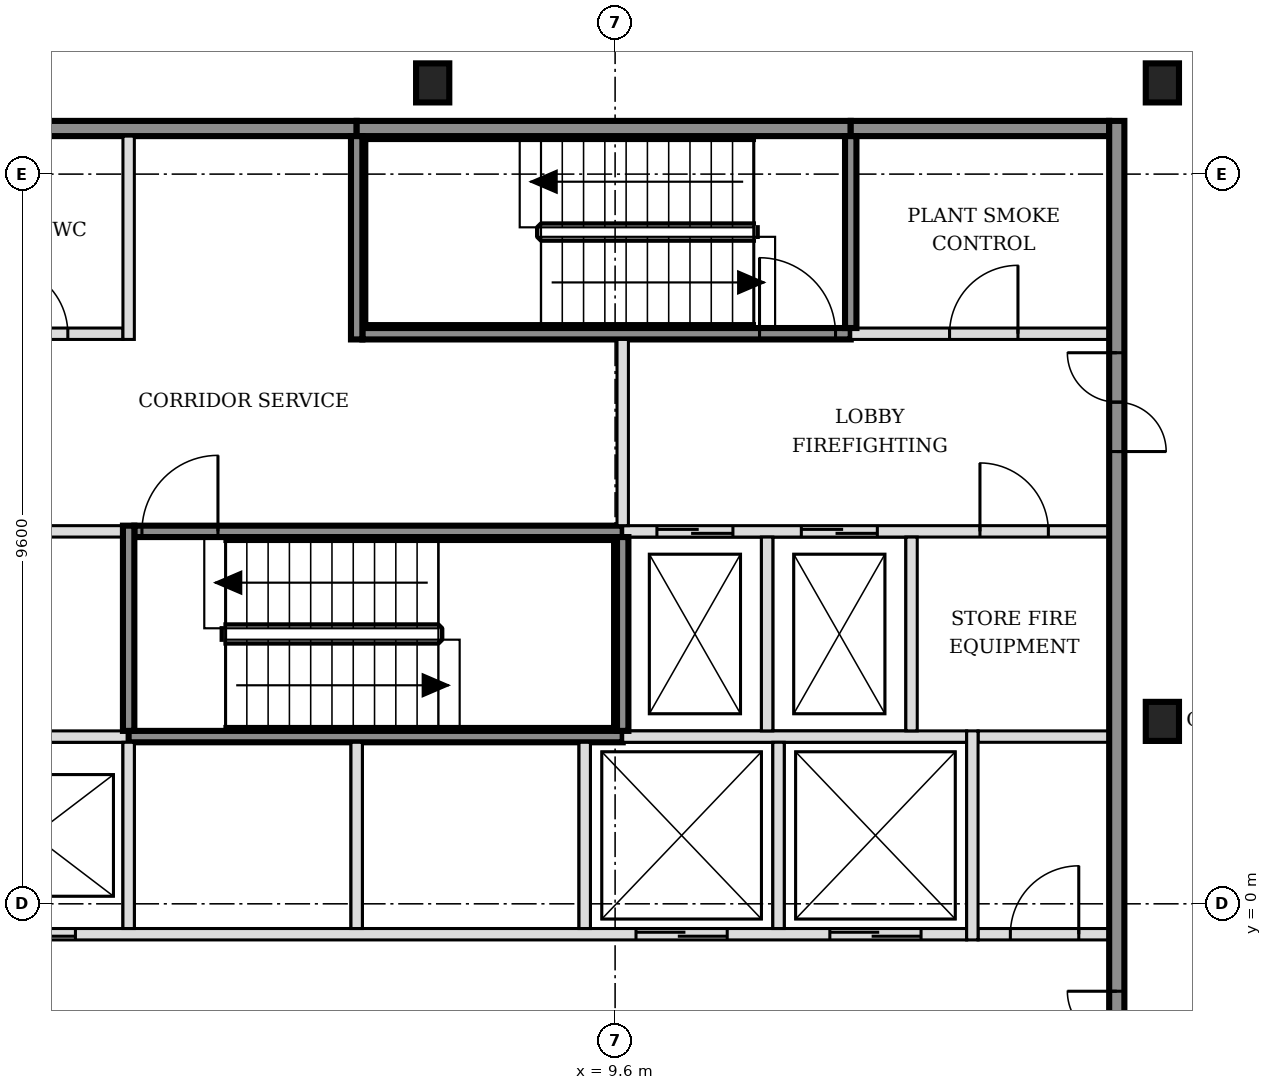
"""IFC4 building model, lengths in metres.
Left out: names, types, materials, properties, quantities, classifications, styles, units other than length and angle.
Written with IfcOpenShell. Run it as: python <this file> out.ifc"""

import sys

from ifc_helpers import new_model, si_unit, direction, frame, frame_2d, origin, origin_2d, place, context, subcontext, project, spatial, rectangle, i_section, extrude, element, fill, save


model = new_model("IFC4")
c1 = context("Model", 3, precision=1e-05, world=origin(), true_north=direction((0.0, 1.0)))
c2 = subcontext(c1, "Body", "Model", "MODEL_VIEW")
j1 = project(units=[si_unit("LENGTHUNIT", "METRE"), si_unit("PLANEANGLEUNIT", "RADIAN")], contexts=[c1])
p1 = place(None, origin())
s1 = spatial("IfcSite", under=j1, at=p1, CompositionType="ELEMENT")
p2 = place(p1, origin())
s2 = spatial("IfcBuilding", under=s1, at=p2, CompositionType="ELEMENT")
p3 = place(p2, frame((0.0, 0.0, 72.6)))
s3 = spatial("IfcBuildingStorey", under=s2, at=p3, CompositionType="ELEMENT", Elevation=72.6)
for number, where, z_axis, x_axis in (
    (1, (16.8, 2.4, -0.15), (0.0, 0.0, 1.0), (1.0, 0.0, 0.0)),
    (2, (7.2, 10.8, -0.15), (0.0, 0.0, 1.0), (1.0, 0.0, 0.0)),
    (3, (16.8, 10.8, -0.15), (0.0, 0.0, 1.0), (1.0, 0.0, 0.0)),
):
    element("IfcColumn", number, at=place(p3, frame(where, z_axis=z_axis, x_axis=x_axis)), inside=s3, PredefinedType="COLUMN", context=c2, shape_type="SweptSolid", body=[
        extrude(i_section(OverallWidth=0.437, OverallDepth=0.514, WebThickness=0.061, FlangeThickness=0.097, FilletRadius=0.015, at=origin_2d()), origin(), (0.0, 0.0, 1.0), 3.6),
    ])
p4 = place(p3, frame((-1.7, -0.4, 0.0), z_axis=(0.0, 0.0, 1.0), x_axis=(1.0, 0.0, 0.0)))
e4 = element("IfcWall", 4, at=p4, inside=s3, PredefinedType="SOLIDWALL", context=c2, shape_type="SweptSolid", body=[
    extrude(rectangle(XDim=15.925, YDim=0.15, at=frame_2d((7.962, 0.0))), origin(), (0.0, 0.0, 1.0), 3.45),
])
p5 = place(p4, frame((0.6, 0.0, 0.0)))
e5 = element("IfcOpeningElement", 5, at=p5, cuts=e4, PredefinedType="OPENING", context=c2, shape_type="SweptSolid", body=[
    extrude(rectangle(XDim=1.1, YDim=2.1, at=frame_2d((0.55, 1.05))), frame((0.0, 0.085, 0.0), z_axis=(0.0, -1.0, 0.0), x_axis=(1.0, 0.0, 0.0)), (0.0, 0.0, 1.0), 0.17),
])
p6 = place(p4, frame((3.1, 0.0, 0.0)))
e6 = element("IfcOpeningElement", 6, at=p6, cuts=e4, PredefinedType="OPENING", context=c2, shape_type="SweptSolid", body=[
    extrude(rectangle(XDim=1.1, YDim=2.1, at=frame_2d((0.55, 1.05))), frame((0.0, 0.085, 0.0), z_axis=(0.0, -1.0, 0.0), x_axis=(1.0, 0.0, 0.0)), (0.0, 0.0, 1.0), 0.17),
])
p7 = place(p4, frame((11.575, 0.0, 0.0)))
e7 = element("IfcOpeningElement", 7, at=p7, cuts=e4, PredefinedType="OPENING", context=c2, shape_type="SweptSolid", body=[
    extrude(rectangle(XDim=1.2, YDim=2.1, at=frame_2d((0.6, 1.05))), frame((0.0, 0.085, 0.0), z_axis=(0.0, -1.0, 0.0), x_axis=(1.0, 0.0, 0.0)), (0.0, 0.0, 1.0), 0.17),
])
p8 = place(p4, frame((14.125, 0.0, 0.0)))
e8 = element("IfcOpeningElement", 8, at=p8, cuts=e4, PredefinedType="OPENING", context=c2, shape_type="SweptSolid", body=[
    extrude(rectangle(XDim=1.2, YDim=2.1, at=frame_2d((0.6, 1.05))), frame((0.0, 0.085, 0.0), z_axis=(0.0, -1.0, 0.0), x_axis=(1.0, 0.0, 0.0)), (0.0, 0.0, 1.0), 0.17),
])
p9 = place(p3, frame((14.375, -0.4, 0.0), z_axis=(0.0, 0.0, 1.0), x_axis=(1.0, 0.0, 0.0)))
e9 = element("IfcWall", 9, at=p9, inside=s3, PredefinedType="PARTITIONING", context=c2, shape_type="SweptSolid", body=[
    extrude(rectangle(XDim=1.725, YDim=0.15, at=frame_2d((0.863, 0.0))), origin(), (0.0, 0.0, 1.0), 3.45),
])
p10 = place(p9, frame((0.425, 0.0, 0.0)))
e10 = element("IfcOpeningElement", 10, at=p10, cuts=e9, PredefinedType="OPENING", context=c2, shape_type="SweptSolid", body=[
    extrude(rectangle(XDim=0.9, YDim=2.1, at=frame_2d((0.45, 1.05))), frame((0.0, 0.085, 0.0), z_axis=(0.0, -1.0, 0.0), x_axis=(1.0, 0.0, 0.0)), (0.0, 0.0, 1.0), 0.17),
])
p11 = place(p3, frame((-1.7, 2.2, 0.0), z_axis=(0.0, 0.0, 1.0), x_axis=(1.0, 0.0, 0.0)))
e11 = element("IfcWall", 11, at=p11, inside=s3, PredefinedType="SOLIDWALL", context=c2, shape_type="SweptSolid", body=[
    extrude(rectangle(XDim=4.9, YDim=0.15, at=frame_2d((2.45, 0.0))), origin(), (0.0, 0.0, 1.0), 3.45),
])
p12 = place(p3, frame((3.2, 2.2, 0.0), z_axis=(0.0, 0.0, 1.0), x_axis=(1.0, 0.0, 0.0)))
e12 = element("IfcWall", 12, at=p12, inside=s3, PredefinedType="SOLIDWALL", context=c2, shape_type="SweptSolid", body=[
    extrude(rectangle(XDim=6.5, YDim=0.15, at=frame_2d((3.25, 0.0))), origin(), (0.0, 0.0, 1.0), 3.45),
])
p13 = place(p3, frame((9.7, 2.2, 0.0), z_axis=(0.0, 0.0, 1.0), x_axis=(1.0, 0.0, 0.0)))
e13 = element("IfcWall", 13, at=p13, inside=s3, PredefinedType="SOLIDWALL", context=c2, shape_type="SweptSolid", body=[
    extrude(rectangle(XDim=4.525, YDim=0.15, at=frame_2d((2.263, 0.0))), origin(), (0.0, 0.0, 1.0), 3.45),
])
p14 = place(p3, frame((14.375, 2.2, 0.0), z_axis=(0.0, 0.0, 1.0), x_axis=(1.0, 0.0, 0.0)))
e14 = element("IfcWall", 14, at=p14, inside=s3, PredefinedType="PARTITIONING", context=c2, shape_type="SweptSolid", body=[
    extrude(rectangle(XDim=1.725, YDim=0.15, at=frame_2d((0.863, 0.0))), origin(), (0.0, 0.0, 1.0), 3.45),
])
p15 = place(p3, frame((-1.7, 4.9, 0.0), z_axis=(0.0, 0.0, 1.0), x_axis=(1.0, 0.0, 0.0)))
e15 = element("IfcWall", 15, at=p15, inside=s3, PredefinedType="PARTITIONING", context=c2, shape_type="SweptSolid", body=[
    extrude(rectangle(XDim=4.825, YDim=0.15, at=frame_2d((2.413, 0.0))), origin(), (0.0, 0.0, 1.0), 3.45),
])
p16 = place(p15, frame((1.95, 0.0, 0.0)))
e16 = element("IfcOpeningElement", 16, at=p16, cuts=e15, PredefinedType="OPENING", context=c2, shape_type="SweptSolid", body=[
    extrude(rectangle(XDim=0.9, YDim=2.1, at=frame_2d((0.45, 1.05))), frame((0.0, 0.085, 0.0), z_axis=(0.0, -1.0, 0.0), x_axis=(1.0, 0.0, 0.0)), (0.0, 0.0, 1.0), 0.17),
])
p17 = place(p3, frame((3.275, 4.9, 0.0), z_axis=(0.0, 0.0, 1.0), x_axis=(1.0, 0.0, 0.0)))
e17 = element("IfcWall", 17, at=p17, inside=s3, PredefinedType="SOLIDWALL", context=c2, shape_type="SweptSolid", body=[
    extrude(rectangle(XDim=6.425, YDim=0.15, at=frame_2d((3.212, 0.0))), origin(), (0.0, 0.0, 1.0), 3.45),
])
p18 = place(p17, frame((0.1, 0.0, 0.0)))
e18 = element("IfcOpeningElement", 18, at=p18, cuts=e17, PredefinedType="OPENING", context=c2, shape_type="SweptSolid", body=[
    extrude(rectangle(XDim=1.0, YDim=2.1, at=frame_2d((0.5, 1.05))), frame((0.0, 0.085, 0.0), z_axis=(0.0, -1.0, 0.0), x_axis=(1.0, 0.0, 0.0)), (0.0, 0.0, 1.0), 0.17),
])
p19 = place(p3, frame((9.7, 4.9, 0.0), z_axis=(0.0, 0.0, 1.0), x_axis=(1.0, 0.0, 0.0)))
e19 = element("IfcWall", 19, at=p19, inside=s3, PredefinedType="SOLIDWALL", context=c2, shape_type="SweptSolid", body=[
    extrude(rectangle(XDim=6.4, YDim=0.15, at=frame_2d((3.2, 0.0))), origin(), (0.0, 0.0, 1.0), 3.45),
])
p20 = place(p19, frame((0.45, 0.0, 0.0)))
e20 = element("IfcOpeningElement", 20, at=p20, cuts=e19, PredefinedType="OPENING", context=c2, shape_type="SweptSolid", body=[
    extrude(rectangle(XDim=1.0, YDim=2.1, at=frame_2d((0.5, 1.05))), frame((0.0, 0.085, 0.0), z_axis=(0.0, -1.0, 0.0), x_axis=(1.0, 0.0, 0.0)), (0.0, 0.0, 1.0), 0.17),
])
p21 = place(p19, frame((2.35, 0.0, 0.0)))
e21 = element("IfcOpeningElement", 21, at=p21, cuts=e19, PredefinedType="OPENING", context=c2, shape_type="SweptSolid", body=[
    extrude(rectangle(XDim=1.0, YDim=2.1, at=frame_2d((0.5, 1.05))), frame((0.0, 0.085, 0.0), z_axis=(0.0, -1.0, 0.0), x_axis=(1.0, 0.0, 0.0)), (0.0, 0.0, 1.0), 0.17),
])
p22 = place(p19, frame((4.7, 0.0, 0.0)))
e22 = element("IfcOpeningElement", 22, at=p22, cuts=e19, PredefinedType="OPENING", context=c2, shape_type="SweptSolid", body=[
    extrude(rectangle(XDim=0.9, YDim=2.1, at=frame_2d((0.45, 1.05))), frame((0.0, 0.085, 0.0), z_axis=(0.0, -1.0, 0.0), x_axis=(1.0, 0.0, 0.0)), (0.0, 0.0, 1.0), 0.17),
])
p23 = place(p3, frame((-1.7, 7.5, 0.0), z_axis=(0.0, 0.0, 1.0), x_axis=(1.0, 0.0, 0.0)))
e23 = element("IfcWall", 23, at=p23, inside=s3, PredefinedType="PARTITIONING", context=c2, shape_type="SweptSolid", body=[
    extrude(rectangle(XDim=4.825, YDim=0.15, at=frame_2d((2.413, 0.0))), origin(), (0.0, 0.0, 1.0), 3.45),
])
p24 = place(p23, frame((0.7, 0.0, 0.0)))
e24 = element("IfcOpeningElement", 24, at=p24, cuts=e23, PredefinedType="OPENING", context=c2, shape_type="SweptSolid", body=[
    extrude(rectangle(XDim=0.9, YDim=2.1, at=frame_2d((0.45, 1.05))), frame((0.0, 0.085, 0.0), z_axis=(0.0, -1.0, 0.0), x_axis=(1.0, 0.0, 0.0)), (0.0, 0.0, 1.0), 0.17),
])
p25 = place(p23, frame((3.2, 0.0, 0.0)))
e25 = element("IfcOpeningElement", 25, at=p25, cuts=e23, PredefinedType="OPENING", context=c2, shape_type="SweptSolid", body=[
    extrude(rectangle(XDim=0.9, YDim=2.1, at=frame_2d((0.45, 1.05))), frame((0.0, 0.085, 0.0), z_axis=(0.0, -1.0, 0.0), x_axis=(1.0, 0.0, 0.0)), (0.0, 0.0, 1.0), 0.17),
])
p26 = place(p3, frame((6.275, 7.5, 0.0), z_axis=(0.0, 0.0, 1.0), x_axis=(1.0, 0.0, 0.0)))
e26 = element("IfcWall", 26, at=p26, inside=s3, PredefinedType="SOLIDWALL", context=c2, shape_type="SweptSolid", body=[
    extrude(rectangle(XDim=6.425, YDim=0.15, at=frame_2d((3.212, 0.0))), origin(), (0.0, 0.0, 1.0), 3.45),
])
p27 = place(p26, frame((5.225, 0.0, 0.0)))
e27 = element("IfcOpeningElement", 27, at=p27, cuts=e26, PredefinedType="OPENING", context=c2, shape_type="SweptSolid", body=[
    extrude(rectangle(XDim=1.0, YDim=2.1, at=frame_2d((0.5, 1.05))), frame((0.0, 0.085, 0.0), z_axis=(0.0, -1.0, 0.0), x_axis=(1.0, 0.0, 0.0)), (0.0, 0.0, 1.0), 0.17),
])
p28 = place(p3, frame((12.7, 7.5, 0.0), z_axis=(0.0, 0.0, 1.0), x_axis=(1.0, 0.0, 0.0)))
e28 = element("IfcWall", 28, at=p28, inside=s3, PredefinedType="SOLIDWALL", context=c2, shape_type="SweptSolid", body=[
    extrude(rectangle(XDim=3.4, YDim=0.15, at=frame_2d((1.7, 0.0))), origin(), (0.0, 0.0, 1.0), 3.45),
])
p29 = place(p28, frame((1.3, 0.0, 0.0)))
e29 = element("IfcOpeningElement", 29, at=p29, cuts=e28, PredefinedType="OPENING", context=c2, shape_type="SweptSolid", body=[
    extrude(rectangle(XDim=0.9, YDim=2.1, at=frame_2d((0.45, 1.05))), frame((0.0, 0.085, 0.0), z_axis=(0.0, -1.0, 0.0), x_axis=(1.0, 0.0, 0.0)), (0.0, 0.0, 1.0), 0.17),
])
p30 = place(p3, frame((-1.7, 10.2, 0.0), z_axis=(0.0, 0.0, 1.0), x_axis=(1.0, 0.0, 0.0)))
e30 = element("IfcWall", 30, at=p30, inside=s3, PredefinedType="SOLIDWALL", context=c2, shape_type="SweptSolid", body=[
    extrude(rectangle(XDim=7.9, YDim=0.2, at=frame_2d((3.95, 0.0))), origin(), (0.0, 0.0, 1.0), 3.45),
])
p31 = place(p3, frame((6.2, 10.2, 0.0), z_axis=(0.0, 0.0, 1.0), x_axis=(1.0, 0.0, 0.0)))
e31 = element("IfcWall", 31, at=p31, inside=s3, PredefinedType="SOLIDWALL", context=c2, shape_type="SweptSolid", body=[
    extrude(rectangle(XDim=6.5, YDim=0.2, at=frame_2d((3.25, 0.0))), origin(), (0.0, 0.0, 1.0), 3.45),
])
p32 = place(p3, frame((12.7, 10.2, 0.0), z_axis=(0.0, 0.0, 1.0), x_axis=(1.0, 0.0, 0.0)))
e32 = element("IfcWall", 32, at=p32, inside=s3, PredefinedType="SOLIDWALL", context=c2, shape_type="SweptSolid", body=[
    extrude(rectangle(XDim=3.4, YDim=0.2, at=frame_2d((1.7, 0.0))), origin(), (0.0, 0.0, 1.0), 3.45),
])
p33 = place(p3, frame((3.2, -0.325, 0.0), z_axis=(0.0, 0.0, 1.0), x_axis=(0.0, 1.0, 0.0)))
e33 = element("IfcWall", 33, at=p33, inside=s3, PredefinedType="SOLIDWALL", context=c2, shape_type="SweptSolid", body=[
    extrude(rectangle(XDim=2.45, YDim=0.15, at=frame_2d((1.225, 0.0))), origin(), (0.0, 0.0, 1.0), 3.45),
])
p34 = place(p3, frame((3.2, 2.275, 0.0), z_axis=(0.0, 0.0, 1.0), x_axis=(0.0, 1.0, 0.0)))
e34 = element("IfcWall", 34, at=p34, inside=s3, PredefinedType="SOLIDWALL", context=c2, shape_type="SweptSolid", body=[
    extrude(rectangle(XDim=2.7, YDim=0.15, at=frame_2d((1.35, 0.0))), origin(), (0.0, 0.0, 1.0), 3.45),
])
p35 = place(p3, frame((3.2, 7.425, 0.0), z_axis=(0.0, 0.0, 1.0), x_axis=(0.0, 1.0, 0.0)))
e35 = element("IfcWall", 35, at=p35, inside=s3, PredefinedType="PARTITIONING", context=c2, shape_type="SweptSolid", body=[
    extrude(rectangle(XDim=2.675, YDim=0.15, at=frame_2d((1.337, 0.0))), origin(), (0.0, 0.0, 1.0), 3.45),
])
p36 = place(p3, frame((6.2, -0.325, 0.0), z_axis=(0.0, 0.0, 1.0), x_axis=(0.0, 1.0, 0.0)))
e36 = element("IfcWall", 36, at=p36, inside=s3, PredefinedType="SOLIDWALL", context=c2, shape_type="SweptSolid", body=[
    extrude(rectangle(XDim=2.45, YDim=0.15, at=frame_2d((1.225, 0.0))), origin(), (0.0, 0.0, 1.0), 3.45),
])
p37 = place(p3, frame((6.2, 7.425, 0.0), z_axis=(0.0, 0.0, 1.0), x_axis=(0.0, 1.0, 0.0)))
e37 = element("IfcWall", 37, at=p37, inside=s3, PredefinedType="SOLIDWALL", context=c2, shape_type="SweptSolid", body=[
    extrude(rectangle(XDim=2.675, YDim=0.15, at=frame_2d((1.337, 0.0))), origin(), (0.0, 0.0, 1.0), 3.45),
])
p38 = place(p3, frame((9.2, -0.325, 0.0), z_axis=(0.0, 0.0, 1.0), x_axis=(0.0, 1.0, 0.0)))
e38 = element("IfcWall", 38, at=p38, inside=s3, PredefinedType="SOLIDWALL", context=c2, shape_type="SweptSolid", body=[
    extrude(rectangle(XDim=2.45, YDim=0.15, at=frame_2d((1.225, 0.0))), origin(), (0.0, 0.0, 1.0), 3.45),
])
p39 = place(p3, frame((9.7, 2.275, 0.0), z_axis=(0.0, 0.0, 1.0), x_axis=(0.0, 1.0, 0.0)))
e39 = element("IfcWall", 39, at=p39, inside=s3, PredefinedType="SOLIDWALL", context=c2, shape_type="SweptSolid", body=[
    extrude(rectangle(XDim=2.55, YDim=0.15, at=frame_2d((1.275, 0.0))), origin(), (0.0, 0.0, 1.0), 3.45),
])
p40 = place(p3, frame((9.7, 4.975, 0.0), z_axis=(0.0, 0.0, 1.0), x_axis=(0.0, 1.0, 0.0)))
e40 = element("IfcWall", 40, at=p40, inside=s3, PredefinedType="SOLIDWALL", context=c2, shape_type="SweptSolid", body=[
    extrude(rectangle(XDim=2.45, YDim=0.15, at=frame_2d((1.225, 0.0))), origin(), (0.0, 0.0, 1.0), 3.45),
])
p41 = place(p3, frame((11.6, 2.275, 0.0), z_axis=(0.0, 0.0, 1.0), x_axis=(0.0, 1.0, 0.0)))
e41 = element("IfcWall", 41, at=p41, inside=s3, PredefinedType="SOLIDWALL", context=c2, shape_type="SweptSolid", body=[
    extrude(rectangle(XDim=2.55, YDim=0.15, at=frame_2d((1.275, 0.0))), origin(), (0.0, 0.0, 1.0), 3.45),
])
p42 = place(p3, frame((11.75, -0.325, 0.0), z_axis=(0.0, 0.0, 1.0), x_axis=(0.0, 1.0, 0.0)))
e42 = element("IfcWall", 42, at=p42, inside=s3, PredefinedType="SOLIDWALL", context=c2, shape_type="SweptSolid", body=[
    extrude(rectangle(XDim=2.45, YDim=0.15, at=frame_2d((1.225, 0.0))), origin(), (0.0, 0.0, 1.0), 3.45),
])
p43 = place(p3, frame((12.7, 7.575, 0.0), z_axis=(0.0, 0.0, 1.0), x_axis=(0.0, 1.0, 0.0)))
e43 = element("IfcWall", 43, at=p43, inside=s3, PredefinedType="SOLIDWALL", context=c2, shape_type="SweptSolid", body=[
    extrude(rectangle(XDim=2.525, YDim=0.15, at=frame_2d((1.263, 0.0))), origin(), (0.0, 0.0, 1.0), 3.45),
])
p44 = place(p3, frame((13.5, 2.275, 0.0), z_axis=(0.0, 0.0, 1.0), x_axis=(0.0, 1.0, 0.0)))
e44 = element("IfcWall", 44, at=p44, inside=s3, PredefinedType="SOLIDWALL", context=c2, shape_type="SweptSolid", body=[
    extrude(rectangle(XDim=2.55, YDim=0.15, at=frame_2d((1.275, 0.0))), origin(), (0.0, 0.0, 1.0), 3.45),
])
p45 = place(p3, frame((14.3, -0.475, 0.0), z_axis=(0.0, 0.0, 1.0), x_axis=(0.0, 1.0, 0.0)))
e45 = element("IfcWall", 45, at=p45, inside=s3, PredefinedType="SOLIDWALL", context=c2, shape_type="SweptSolid", body=[
    extrude(rectangle(XDim=2.75, YDim=0.15, at=frame_2d((1.375, 0.0))), origin(), (0.0, 0.0, 1.0), 3.45),
])
p46 = place(p3, frame((16.2, -5.5, 0.0), z_axis=(0.0, 0.0, 1.0), x_axis=(0.0, 1.0, 0.0)))
e46 = element("IfcWall", 46, at=p46, inside=s3, PredefinedType="SOLIDWALL", context=c2, shape_type="SweptSolid", body=[
    extrude(rectangle(XDim=15.8, YDim=0.2, at=frame_2d((7.9, 0.0))), origin(), (0.0, 0.0, 1.0), 3.45),
])
p47 = place(p46, frame((3.05, 0.0, 0.0)))
e47 = element("IfcOpeningElement", 47, at=p47, cuts=e46, PredefinedType="OPENING", context=c2, shape_type="SweptSolid", body=[
    extrude(rectangle(XDim=1.3, YDim=2.1, at=frame_2d((0.65, 1.05))), frame((0.0, 0.11, 0.0), z_axis=(0.0, -1.0, 0.0), x_axis=(1.0, 0.0, 0.0)), (0.0, 0.0, 1.0), 0.22),
])
p48 = place(p46, frame((11.45, 0.0, 0.0)))
e48 = element("IfcOpeningElement", 48, at=p48, cuts=e46, PredefinedType="OPENING", context=c2, shape_type="SweptSolid", body=[
    extrude(rectangle(XDim=1.3, YDim=2.1, at=frame_2d((0.65, 1.05))), frame((0.0, 0.11, 0.0), z_axis=(0.0, -1.0, 0.0), x_axis=(1.0, 0.0, 0.0)), (0.0, 0.0, 1.0), 0.22),
])
p49 = place(p6, origin())
e49 = element("IfcDoor", 49, at=p49, inside=s3, OperationType="DOUBLE_DOOR_SLIDING", PredefinedType="DOOR", context=c2, shape_type="SweptSolid", body=[
    extrude(rectangle(XDim=1.1, YDim=2.1, at=frame_2d((0.55, 1.05))), frame((0.0, 0.025, 0.0), z_axis=(0.0, -1.0, 0.0), x_axis=(1.0, 0.0, 0.0)), (0.0, 0.0, 1.0), 0.05),
])
fill(e6, e49)
p50 = place(p7, origin())
e50 = element("IfcDoor", 50, at=p50, inside=s3, OperationType="DOUBLE_DOOR_SLIDING", PredefinedType="DOOR", context=c2, shape_type="SweptSolid", body=[
    extrude(rectangle(XDim=1.2, YDim=2.1, at=frame_2d((0.6, 1.05))), frame((0.0, 0.025, 0.0), z_axis=(0.0, -1.0, 0.0), x_axis=(1.0, 0.0, 0.0)), (0.0, 0.0, 1.0), 0.05),
])
fill(e7, e50)
p51 = place(p8, origin())
e51 = element("IfcDoor", 51, at=p51, inside=s3, OperationType="DOUBLE_DOOR_SLIDING", PredefinedType="DOOR", context=c2, shape_type="SweptSolid", body=[
    extrude(rectangle(XDim=1.2, YDim=2.1, at=frame_2d((0.6, 1.05))), frame((0.0, 0.025, 0.0), z_axis=(0.0, -1.0, 0.0), x_axis=(1.0, 0.0, 0.0)), (0.0, 0.0, 1.0), 0.05),
])
fill(e8, e51)
p52 = place(p20, origin())
e52 = element("IfcDoor", 52, at=p52, inside=s3, OperationType="DOUBLE_DOOR_SLIDING", PredefinedType="DOOR", context=c2, shape_type="SweptSolid", body=[
    extrude(rectangle(XDim=1.0, YDim=2.1, at=frame_2d((0.5, 1.05))), frame((0.0, 0.025, 0.0), z_axis=(0.0, -1.0, 0.0), x_axis=(1.0, 0.0, 0.0)), (0.0, 0.0, 1.0), 0.05),
])
fill(e20, e52)
p53 = place(p21, origin())
e53 = element("IfcDoor", 53, at=p53, inside=s3, OperationType="DOUBLE_DOOR_SLIDING", PredefinedType="DOOR", context=c2, shape_type="SweptSolid", body=[
    extrude(rectangle(XDim=1.0, YDim=2.1, at=frame_2d((0.5, 1.05))), frame((0.0, 0.025, 0.0), z_axis=(0.0, -1.0, 0.0), x_axis=(1.0, 0.0, 0.0)), (0.0, 0.0, 1.0), 0.05),
])
fill(e21, e53)
p54 = place(p18, origin())
e54 = element("IfcDoor", 54, at=p54, inside=s3, OperationType="SINGLE_SWING_RIGHT", PredefinedType="DOOR", context=c2, shape_type="SweptSolid", body=[
    extrude(rectangle(XDim=1.0, YDim=2.1, at=frame_2d((0.5, 1.05))), frame((0.0, 0.025, 0.0), z_axis=(0.0, -1.0, 0.0), x_axis=(1.0, 0.0, 0.0)), (0.0, 0.0, 1.0), 0.05),
])
fill(e18, e54)
p55 = place(p27, origin())
e55 = element("IfcDoor", 55, at=p55, inside=s3, OperationType="SINGLE_SWING_LEFT", PredefinedType="DOOR", context=c2, shape_type="SweptSolid", body=[
    extrude(rectangle(XDim=1.0, YDim=2.1, at=frame_2d((0.5, 1.05))), frame((0.0, 0.025, 0.0), z_axis=(0.0, -1.0, 0.0), x_axis=(1.0, 0.0, 0.0)), (0.0, 0.0, 1.0), 0.05),
])
fill(e27, e55)
p56 = place(p47, origin())
e56 = element("IfcDoor", 56, at=p56, inside=s3, OperationType="DOUBLE_DOOR_SINGLE_SWING", PredefinedType="DOOR", context=c2, shape_type="SweptSolid", body=[
    extrude(rectangle(XDim=1.3, YDim=2.1, at=frame_2d((0.65, 1.05))), frame((0.0, 0.025, 0.0), z_axis=(0.0, -1.0, 0.0), x_axis=(1.0, 0.0, 0.0)), (0.0, 0.0, 1.0), 0.05),
])
fill(e47, e56)
p57 = place(p48, origin())
e57 = element("IfcDoor", 57, at=p57, inside=s3, OperationType="DOUBLE_DOOR_SINGLE_SWING", PredefinedType="DOOR", context=c2, shape_type="SweptSolid", body=[
    extrude(rectangle(XDim=1.3, YDim=2.1, at=frame_2d((0.65, 1.05))), frame((0.0, 0.025, 0.0), z_axis=(0.0, -1.0, 0.0), x_axis=(1.0, 0.0, 0.0)), (0.0, 0.0, 1.0), 0.05),
])
fill(e48, e57)
p58 = place(p10, origin())
e58 = element("IfcDoor", 58, at=p58, inside=s3, OperationType="SINGLE_SWING_RIGHT", PredefinedType="DOOR", context=c2, shape_type="SweptSolid", body=[
    extrude(rectangle(XDim=0.9, YDim=2.1, at=frame_2d((0.45, 1.05))), frame((0.0, 0.025, 0.0), z_axis=(0.0, -1.0, 0.0), x_axis=(1.0, 0.0, 0.0)), (0.0, 0.0, 1.0), 0.05),
])
fill(e10, e58)
p59 = place(p22, origin())
e59 = element("IfcDoor", 59, at=p59, inside=s3, OperationType="SINGLE_SWING_LEFT", PredefinedType="DOOR", context=c2, shape_type="SweptSolid", body=[
    extrude(rectangle(XDim=0.9, YDim=2.1, at=frame_2d((0.45, 1.05))), frame((0.0, 0.025, 0.0), z_axis=(0.0, -1.0, 0.0), x_axis=(1.0, 0.0, 0.0)), (0.0, 0.0, 1.0), 0.05),
])
fill(e22, e59)
p60 = place(p29, origin())
e60 = element("IfcDoor", 60, at=p60, inside=s3, OperationType="SINGLE_SWING_RIGHT", PredefinedType="DOOR", context=c2, shape_type="SweptSolid", body=[
    extrude(rectangle(XDim=0.9, YDim=2.1, at=frame_2d((0.45, 1.05))), frame((0.0, 0.025, 0.0), z_axis=(0.0, -1.0, 0.0), x_axis=(1.0, 0.0, 0.0)), (0.0, 0.0, 1.0), 0.05),
])
fill(e29, e60)
p61 = place(p25, origin())
e61 = element("IfcDoor", 61, at=p61, inside=s3, OperationType="SINGLE_SWING_LEFT", PredefinedType="DOOR", context=c2, shape_type="SweptSolid", body=[
    extrude(rectangle(XDim=0.9, YDim=2.1, at=frame_2d((0.45, 1.05))), frame((0.0, 0.025, 0.0), z_axis=(0.0, -1.0, 0.0), x_axis=(1.0, 0.0, 0.0)), (0.0, 0.0, 1.0), 0.05),
])
fill(e25, e61)
save(model, sys.argv[1])
